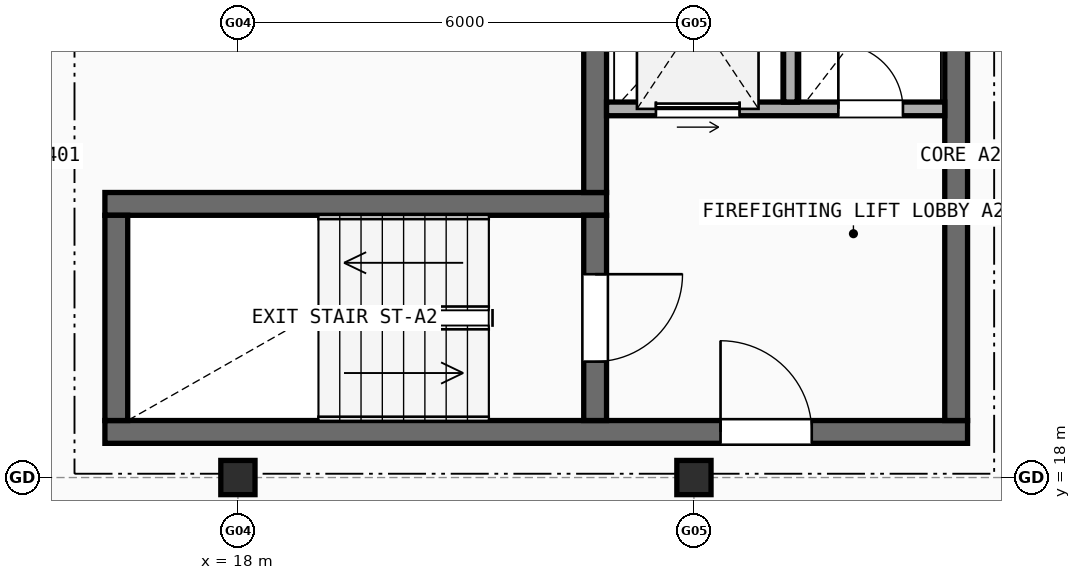
"""IFC4 building model, lengths in metres.
Left out: names, types, materials, properties, quantities, classifications, styles, units other than length and angle.
Written with IfcOpenShell. Run it as: python <this file> out.ifc"""

import sys

from ifc_helpers import new_model, si_unit, direction, frame, frame_2d, origin, origin_2d, place, context, subcontext, project, spatial, rectangle, extrude, element, fill, save


model = new_model("IFC4")
c1 = context("Model", 3, precision=1e-05, world=origin(), true_north=direction((0.0, 1.0)))
c2 = subcontext(c1, "Body", "Model", "MODEL_VIEW")
j1 = project(units=[si_unit("LENGTHUNIT", "METRE"), si_unit("PLANEANGLEUNIT", "RADIAN")], contexts=[c1])
p1 = place(None, origin())
s1 = spatial("IfcSite", under=j1, at=p1, CompositionType="ELEMENT")
p2 = place(p1, origin())
s2 = spatial("IfcBuilding", under=s1, at=p2, CompositionType="ELEMENT")
p3 = place(p2, frame((0.0, 0.0, 36.5)))
s3 = spatial("IfcBuildingStorey", under=s2, at=p3, CompositionType="ELEMENT", Elevation=36.5)
for number, where, z_axis, x_axis in (
    (1, (18.0, 18.0, 0.0), (0.0, 0.0, 1.0), (1.0, 0.0, 0.0)),
    (2, (24.0, 18.0, 0.0), (0.0, 0.0, 1.0), (1.0, 0.0, 0.0)),
):
    element("IfcColumn", number, at=place(p3, frame(where, z_axis=z_axis, x_axis=x_axis)), inside=s3, PredefinedType="COLUMN", context=c2, shape_type="SweptSolid", body=[
        extrude(rectangle(XDim=0.45, YDim=0.45, at=origin_2d()), origin(), (0.0, 0.0, 1.0), 2.995),
    ])
p4 = place(p3, frame((16.25, 18.6, 0.0), z_axis=(0.0, 0.0, 1.0), x_axis=(1.0, 0.0, 0.0)))
e3 = element("IfcWall", 3, at=p4, inside=s3, PredefinedType="SHEAR", context=c2, shape_type="SweptSolid", body=[
    extrude(rectangle(XDim=11.35, YDim=0.3, at=frame_2d((5.675, 0.0))), origin(), (0.0, 0.0, 1.0), 2.995),
])
p5 = place(p4, frame((8.1, 0.0, 0.0)))
e4 = element("IfcOpeningElement", 4, at=p5, cuts=e3, PredefinedType="OPENING", context=c2, shape_type="SweptSolid", body=[
    extrude(rectangle(XDim=1.2, YDim=2.15, at=frame_2d((0.6, 1.075))), frame((0.0, 0.16, 0.0), z_axis=(0.0, -1.0, 0.0), x_axis=(1.0, 0.0, 0.0)), (0.0, 0.0, 1.0), 0.32),
])
p6 = place(p3, frame((22.85, 21.6, 0.0), z_axis=(0.0, 0.0, 1.0), x_axis=(-1.0, 0.0, 0.0)))
e5 = element("IfcWall", 5, at=p6, inside=s3, PredefinedType="SHEAR", context=c2, shape_type="SweptSolid", body=[
    extrude(rectangle(XDim=6.6, YDim=0.3, at=frame_2d((3.3, 0.0))), origin(), (0.0, 0.0, 1.0), 2.995),
])
p7 = place(p3, frame((16.4, 21.45, 0.0), z_axis=(0.0, 0.0, 1.0), x_axis=(0.0, -1.0, 0.0)))
e6 = element("IfcWall", 6, at=p7, inside=s3, PredefinedType="SHEAR", context=c2, shape_type="SweptSolid", body=[
    extrude(rectangle(XDim=2.7, YDim=0.3, at=frame_2d((1.35, 0.0))), origin(), (0.0, 0.0, 1.0), 2.995),
])
p8 = place(p3, frame((22.7, 18.75, 0.0), z_axis=(0.0, 0.0, 1.0), x_axis=(0.0, 1.0, 0.0)))
e7 = element("IfcWall", 7, at=p8, inside=s3, PredefinedType="SHEAR", context=c2, shape_type="SweptSolid", body=[
    extrude(rectangle(XDim=2.7, YDim=0.3, at=frame_2d((1.35, 0.0))), origin(), (0.0, 0.0, 1.0), 2.995),
])
p9 = place(p8, frame((0.775, 0.0, 0.0)))
e8 = element("IfcOpeningElement", 8, at=p9, cuts=e7, PredefinedType="OPENING", context=c2, shape_type="SweptSolid", body=[
    extrude(rectangle(XDim=1.15, YDim=2.15, at=frame_2d((0.575, 1.075))), frame((0.0, 0.16, 0.0), z_axis=(0.0, -1.0, 0.0), x_axis=(1.0, 0.0, 0.0)), (0.0, 0.0, 1.0), 0.32),
])
p10 = place(p3, frame((27.45, 18.75, 0.0), z_axis=(0.0, 0.0, 1.0), x_axis=(0.0, 1.0, 0.0)))
e9 = element("IfcWall", 9, at=p10, inside=s3, PredefinedType="SHEAR", context=c2, shape_type="SweptSolid", body=[
    extrude(rectangle(XDim=6.45, YDim=0.3, at=frame_2d((3.225, 0.0))), origin(), (0.0, 0.0, 1.0), 2.995),
])
p11 = place(p3, frame((22.7, 21.75, 0.0), z_axis=(0.0, 0.0, 1.0), x_axis=(0.0, 1.0, 0.0)))
e10 = element("IfcWall", 10, at=p11, inside=s3, PredefinedType="SHEAR", context=c2, shape_type="SweptSolid", body=[
    extrude(rectangle(XDim=3.45, YDim=0.3, at=frame_2d((1.725, 0.0))), origin(), (0.0, 0.0, 1.0), 2.995),
])
p12 = place(p3, frame((22.85, 22.85, 0.0), z_axis=(0.0, 0.0, 1.0), x_axis=(1.0, 0.0, 0.0)))
e11 = element("IfcWall", 11, at=p12, inside=s3, PredefinedType="SOLIDWALL", context=c2, shape_type="SweptSolid", body=[
    extrude(rectangle(XDim=4.45, YDim=0.18, at=frame_2d((2.225, 0.0))), origin(), (0.0, 0.0, 1.0), 2.995),
])
p13 = place(p12, frame((0.65, 0.0, 0.0)))
e12 = element("IfcOpeningElement", 12, at=p13, cuts=e11, PredefinedType="OPENING", context=c2, shape_type="SweptSolid", body=[
    extrude(rectangle(XDim=1.1, YDim=2.15, at=frame_2d((0.55, 1.075))), frame((0.0, 0.1, 0.0), z_axis=(0.0, -1.0, 0.0), x_axis=(1.0, 0.0, 0.0)), (0.0, 0.0, 1.0), 0.2),
])
p14 = place(p12, frame((3.05, 0.0, 0.0)))
e13 = element("IfcOpeningElement", 13, at=p14, cuts=e11, PredefinedType="OPENING", context=c2, shape_type="SweptSolid", body=[
    extrude(rectangle(XDim=0.85, YDim=2.1, at=frame_2d((0.425, 1.05))), frame((0.0, 0.1, 0.0), z_axis=(0.0, -1.0, 0.0), x_axis=(1.0, 0.0, 0.0)), (0.0, 0.0, 1.0), 0.2),
])
p15 = place(p3, frame((25.27, 22.94, 0.0), z_axis=(0.0, 0.0, 1.0), x_axis=(0.0, 1.0, 0.0)))
e14 = element("IfcWall", 14, at=p15, inside=s3, PredefinedType="SOLIDWALL", context=c2, shape_type="SweptSolid", body=[
    extrude(rectangle(XDim=2.26, YDim=0.18, at=frame_2d((1.13, 0.0))), origin(), (0.0, 0.0, 1.0), 2.995),
])
p16 = place(p5, origin())
e15 = element("IfcDoor", 15, at=p16, inside=s3, OperationType="SINGLE_SWING_LEFT", PredefinedType="DOOR", context=c2, shape_type="SweptSolid", body=[
    extrude(rectangle(XDim=1.2, YDim=2.15, at=frame_2d((0.6, 1.075))), frame((0.0, 0.025, 0.0), z_axis=(0.0, -1.0, 0.0), x_axis=(1.0, 0.0, 0.0)), (0.0, 0.0, 1.0), 0.05),
])
fill(e4, e15)
p17 = place(p9, origin())
e16 = element("IfcDoor", 16, at=p17, inside=s3, OperationType="SINGLE_SWING_RIGHT", PredefinedType="DOOR", context=c2, shape_type="SweptSolid", body=[
    extrude(rectangle(XDim=1.15, YDim=2.15, at=frame_2d((0.575, 1.075))), frame((0.0, 0.025, 0.0), z_axis=(0.0, -1.0, 0.0), x_axis=(1.0, 0.0, 0.0)), (0.0, 0.0, 1.0), 0.05),
])
fill(e8, e16)
p18 = place(p13, origin())
e17 = element("IfcDoor", 17, at=p18, inside=s3, OperationType="SLIDING_TO_LEFT", PredefinedType="DOOR", context=c2, shape_type="SweptSolid", body=[
    extrude(rectangle(XDim=1.1, YDim=2.15, at=frame_2d((0.55, 1.075))), frame((0.0, 0.025, 0.0), z_axis=(0.0, -1.0, 0.0), x_axis=(1.0, 0.0, 0.0)), (0.0, 0.0, 1.0), 0.05),
])
fill(e12, e17)
p19 = place(p14, frame((0.85, 0.0, 0.0), z_axis=(0.0, 0.0, 1.0), x_axis=(-1.0, 0.0, 0.0)))
e18 = element("IfcDoor", 18, at=p19, inside=s3, OperationType="SINGLE_SWING_LEFT", PredefinedType="DOOR", context=c2, shape_type="SweptSolid", body=[
    extrude(rectangle(XDim=0.85, YDim=2.1, at=frame_2d((0.425, 1.05))), frame((0.0, 0.025, 0.0), z_axis=(0.0, -1.0, 0.0), x_axis=(1.0, 0.0, 0.0)), (0.0, 0.0, 1.0), 0.05),
])
fill(e13, e18)
save(model, sys.argv[1])
